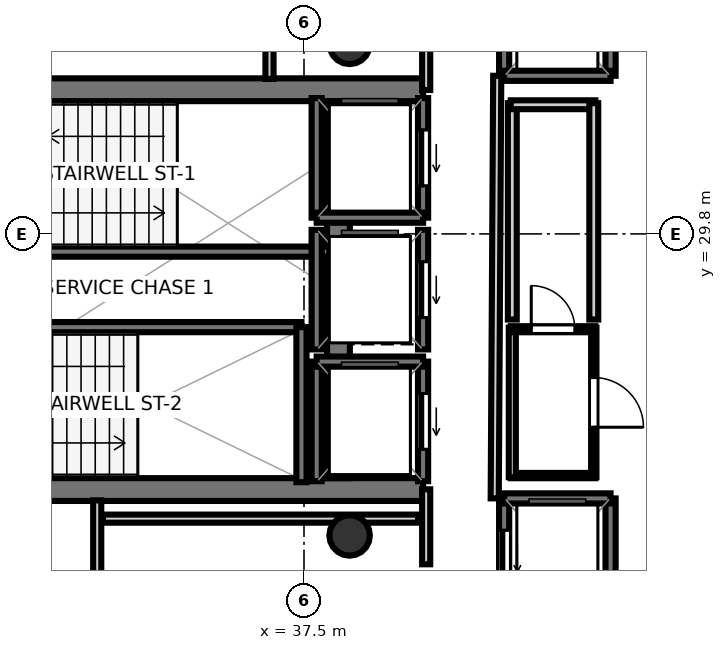
"""IFC4 building model, lengths in metres.
Left out: names, types, materials, properties, quantities, classifications, styles, units other than length and angle.
Written with IfcOpenShell. Run it as: python <this file> out.ifc"""

import sys

from ifc_helpers import new_model, si_unit, direction, frame, frame_2d, origin, origin_2d, place, context, subcontext, project, spatial, rectangle, hollow_circle, extrude, element, fill, save


model = new_model("IFC4")
c1 = context("Model", 3, precision=1e-05, world=origin(), true_north=direction((0.0, 1.0)))
c2 = subcontext(c1, "Body", "Model", "MODEL_VIEW")
j1 = project(units=[si_unit("LENGTHUNIT", "METRE"), si_unit("PLANEANGLEUNIT", "RADIAN")], contexts=[c1])
p1 = place(None, origin())
s1 = spatial("IfcSite", under=j1, at=p1, CompositionType="ELEMENT")
p2 = place(p1, origin())
s2 = spatial("IfcBuilding", under=s1, at=p2, CompositionType="ELEMENT")
p3 = place(p2, frame((0.0, 0.0, 325.9)))
s3 = spatial("IfcBuildingStorey", under=s2, at=p3, CompositionType="ELEMENT", Elevation=325.9)
p4 = place(p3, frame((29.33, 32.645, 0.0), z_axis=(0.0, 0.0, 1.0), x_axis=(1.0, 0.0, 0.0)))
e1 = element("IfcWall", 1, at=p4, inside=s3, PredefinedType="SHEAR", context=c2, shape_type="SweptSolid", body=[
    extrude(rectangle(XDim=10.52, YDim=0.45, at=frame_2d((5.26, 0.0))), origin(), (0.0, 0.0, 1.0), 3.52),
])
p5 = place(p4, frame((0.895, 0.0, 0.0)))
e2 = element("IfcOpeningElement", 2, at=p5, cuts=e1, PredefinedType="OPENING", context=c2, shape_type="SweptSolid", body=[
    extrude(rectangle(XDim=1.25, YDim=2.15, at=frame_2d((0.625, 1.075))), frame((0.0, 0.235, 0.0), z_axis=(0.0, -1.0, 0.0), x_axis=(1.0, 0.0, 0.0)), (0.0, 0.0, 1.0), 0.47),
])
p6 = place(p3, frame((29.33, 24.755, 0.0), z_axis=(0.0, 0.0, 1.0), x_axis=(1.0, 0.0, 0.0)))
e3 = element("IfcWall", 3, at=p6, inside=s3, PredefinedType="SHEAR", context=c2, shape_type="SweptSolid", body=[
    extrude(rectangle(XDim=10.52, YDim=0.45, at=frame_2d((5.26, 0.0))), origin(), (0.0, 0.0, 1.0), 3.52),
])
p7 = place(p6, frame((0.695, 0.0, 0.0)))
e4 = element("IfcOpeningElement", 4, at=p7, cuts=e3, PredefinedType="OPENING", context=c2, shape_type="SweptSolid", body=[
    extrude(rectangle(XDim=1.25, YDim=2.15, at=frame_2d((0.625, 1.075))), frame((0.0, 0.235, 0.0), z_axis=(0.0, -1.0, 0.0), x_axis=(1.0, 0.0, 0.0)), (0.0, 0.0, 1.0), 0.47),
])
p8 = place(p3, frame((38.18, 24.98, 0.0), z_axis=(0.0, 0.0, 1.0), x_axis=(0.0, 1.0, 0.0)))
e5 = element("IfcWall", 5, at=p8, inside=s3, PredefinedType="SHEAR", context=c2, shape_type="SweptSolid", body=[
    extrude(rectangle(XDim=7.44, YDim=0.45, at=frame_2d((3.72, 0.0))), origin(), (0.0, 0.0, 1.0), 3.52),
])
for number, where, z_axis, x_axis in (
    (6, (38.4, 33.55, 0.0), (0.0, 0.0, 1.0), (1.0, 0.0, 0.0)),
    (7, (38.4, 23.85, 0.0), (0.0, 0.0, 1.0), (1.0, 0.0, 0.0)),
):
    element("IfcColumn", number, at=place(p3, frame(where, z_axis=z_axis, x_axis=x_axis)), inside=s3, PredefinedType="COLUMN", context=c2, shape_type="SweptSolid", body=[
        extrude(hollow_circle(Radius=0.4, WallThickness=0.022, at=origin_2d()), origin(), (0.0, 0.0, 1.0), 3.7),
    ])
p9 = place(p3, frame((29.7, 29.45, 0.0), z_axis=(0.0, 0.0, 1.0), x_axis=(1.0, 0.0, 0.0)))
e8 = element("IfcWall", 8, at=p9, inside=s3, PredefinedType="SOLIDWALL", context=c2, shape_type="SweptSolid", body=[
    extrude(rectangle(XDim=8.3, YDim=0.2, at=frame_2d((4.15, 0.0))), origin(), (0.0, 0.0, 1.0), 3.52),
])
p10 = place(p3, frame((29.7, 27.96, 0.0), z_axis=(0.0, 0.0, 1.0), x_axis=(1.0, 0.0, 0.0)))
e9 = element("IfcWall", 9, at=p10, inside=s3, PredefinedType="SOLIDWALL", context=c2, shape_type="SweptSolid", body=[
    extrude(rectangle(XDim=7.75, YDim=0.2, at=frame_2d((3.875, 0.0))), origin(), (0.0, 0.0, 1.0), 3.52),
])
p11 = place(p3, frame((37.45, 24.9, 0.0), z_axis=(0.0, 0.0, 1.0), x_axis=(0.0, 1.0, 0.0)))
e10 = element("IfcWall", 10, at=p11, inside=s3, PredefinedType="SOLIDWALL", context=c2, shape_type="SweptSolid", body=[
    extrude(rectangle(XDim=3.06, YDim=0.2, at=frame_2d((1.53, 0.0))), origin(), (0.0, 0.0, 1.0), 3.52),
])
p12 = place(p3, frame((39.85, 30.12, 0.0), z_axis=(0.0, 0.0, 1.0), x_axis=(0.0, 1.0, 0.0)))
e11 = element("IfcWall", 11, at=p12, inside=s3, PredefinedType="SOLIDWALL", context=c2, shape_type="SweptSolid", body=[
    extrude(rectangle(XDim=2.36, YDim=0.2, at=frame_2d((1.18, 0.0))), origin(), (0.0, 0.0, 1.0), 3.52),
])
p13 = place(p12, frame((0.63, 0.0, 0.0)))
e12 = element("IfcOpeningElement", 12, at=p13, cuts=e11, PredefinedType="OPENING", context=c2, shape_type="SweptSolid", body=[
    extrude(rectangle(XDim=1.1, YDim=2.15, at=frame_2d((0.55, 1.075))), frame((0.0, 0.11, 0.0), z_axis=(0.0, -1.0, 0.0), x_axis=(1.0, 0.0, 0.0)), (0.0, 0.0, 1.0), 0.22),
])
p14 = place(p3, frame((37.75, 30.12, 0.0), z_axis=(0.0, 0.0, 1.0), x_axis=(0.0, 1.0, 0.0)))
e13 = element("IfcWall", 13, at=p14, inside=s3, PredefinedType="SOLIDWALL", context=c2, shape_type="SweptSolid", body=[
    extrude(rectangle(XDim=2.36, YDim=0.2, at=frame_2d((1.18, 0.0))), origin(), (0.0, 0.0, 1.0), 3.52),
])
p15 = place(p3, frame((37.75, 30.12, 0.0), z_axis=(0.0, 0.0, 1.0), x_axis=(1.0, 0.0, 0.0)))
e14 = element("IfcWall", 14, at=p15, inside=s3, PredefinedType="SOLIDWALL", context=c2, shape_type="SweptSolid", body=[
    extrude(rectangle(XDim=2.1, YDim=0.2, at=frame_2d((1.05, 0.0))), origin(), (0.0, 0.0, 1.0), 3.52),
])
p16 = place(p3, frame((39.85, 24.92, 0.0), z_axis=(0.0, 0.0, 1.0), x_axis=(0.0, 1.0, 0.0)))
e15 = element("IfcWall", 15, at=p16, inside=s3, PredefinedType="SOLIDWALL", context=c2, shape_type="SweptSolid", body=[
    extrude(rectangle(XDim=2.36, YDim=0.2, at=frame_2d((1.18, 0.0))), origin(), (0.0, 0.0, 1.0), 3.52),
])
p17 = place(p16, frame((0.63, 0.0, 0.0)))
e16 = element("IfcOpeningElement", 16, at=p17, cuts=e15, PredefinedType="OPENING", context=c2, shape_type="SweptSolid", body=[
    extrude(rectangle(XDim=1.1, YDim=2.15, at=frame_2d((0.55, 1.075))), frame((0.0, 0.11, 0.0), z_axis=(0.0, -1.0, 0.0), x_axis=(1.0, 0.0, 0.0)), (0.0, 0.0, 1.0), 0.22),
])
p18 = place(p3, frame((37.75, 24.92, 0.0), z_axis=(0.0, 0.0, 1.0), x_axis=(0.0, 1.0, 0.0)))
e17 = element("IfcWall", 17, at=p18, inside=s3, PredefinedType="SOLIDWALL", context=c2, shape_type="SweptSolid", body=[
    extrude(rectangle(XDim=2.36, YDim=0.2, at=frame_2d((1.18, 0.0))), origin(), (0.0, 0.0, 1.0), 3.52),
])
p19 = place(p3, frame((37.75, 27.28, 0.0), z_axis=(0.0, 0.0, 1.0), x_axis=(1.0, 0.0, 0.0)))
e18 = element("IfcWall", 18, at=p19, inside=s3, PredefinedType="SOLIDWALL", context=c2, shape_type="SweptSolid", body=[
    extrude(rectangle(XDim=2.1, YDim=0.2, at=frame_2d((1.05, 0.0))), origin(), (0.0, 0.0, 1.0), 3.52),
])
p20 = place(p3, frame((39.85, 27.52, 0.0), z_axis=(0.0, 0.0, 1.0), x_axis=(0.0, 1.0, 0.0)))
e19 = element("IfcWall", 19, at=p20, inside=s3, PredefinedType="SOLIDWALL", context=c2, shape_type="SweptSolid", body=[
    extrude(rectangle(XDim=2.36, YDim=0.2, at=frame_2d((1.18, 0.0))), origin(), (0.0, 0.0, 1.0), 3.52),
])
p21 = place(p20, frame((0.63, 0.0, 0.0)))
e20 = element("IfcOpeningElement", 20, at=p21, cuts=e19, PredefinedType="OPENING", context=c2, shape_type="SweptSolid", body=[
    extrude(rectangle(XDim=1.1, YDim=2.15, at=frame_2d((0.55, 1.075))), frame((0.0, 0.11, 0.0), z_axis=(0.0, -1.0, 0.0), x_axis=(1.0, 0.0, 0.0)), (0.0, 0.0, 1.0), 0.22),
])
p22 = place(p3, frame((37.75, 27.52, 0.0), z_axis=(0.0, 0.0, 1.0), x_axis=(0.0, 1.0, 0.0)))
e21 = element("IfcWall", 21, at=p22, inside=s3, PredefinedType="SOLIDWALL", context=c2, shape_type="SweptSolid", body=[
    extrude(rectangle(XDim=2.36, YDim=0.2, at=frame_2d((1.18, 0.0))), origin(), (0.0, 0.0, 1.0), 3.52),
])
p23 = place(p3, frame((43.55, 22.22, 0.0), z_axis=(0.0, 0.0, 1.0), x_axis=(0.0, 1.0, 0.0)))
e22 = element("IfcWall", 22, at=p23, inside=s3, PredefinedType="SOLIDWALL", context=c2, shape_type="SweptSolid", body=[
    extrude(rectangle(XDim=2.36, YDim=0.2, at=frame_2d((1.18, 0.0))), origin(), (0.0, 0.0, 1.0), 3.52),
])
p24 = place(p3, frame((41.45, 22.22, 0.0), z_axis=(0.0, 0.0, 1.0), x_axis=(0.0, 1.0, 0.0)))
e23 = element("IfcWall", 23, at=p24, inside=s3, PredefinedType="SOLIDWALL", context=c2, shape_type="SweptSolid", body=[
    extrude(rectangle(XDim=2.36, YDim=0.2, at=frame_2d((1.18, 0.0))), origin(), (0.0, 0.0, 1.0), 3.52),
])
p25 = place(p24, frame((0.63, 0.0, 0.0)))
e24 = element("IfcOpeningElement", 24, at=p25, cuts=e23, PredefinedType="OPENING", context=c2, shape_type="SweptSolid", body=[
    extrude(rectangle(XDim=1.1, YDim=2.15, at=frame_2d((0.55, 1.075))), frame((0.0, 0.11, 0.0), z_axis=(0.0, -1.0, 0.0), x_axis=(1.0, 0.0, 0.0)), (0.0, 0.0, 1.0), 0.22),
])
p26 = place(p3, frame((41.45, 24.58, 0.0), z_axis=(0.0, 0.0, 1.0), x_axis=(1.0, 0.0, 0.0)))
e25 = element("IfcWall", 25, at=p26, inside=s3, PredefinedType="SOLIDWALL", context=c2, shape_type="SweptSolid", body=[
    extrude(rectangle(XDim=2.1, YDim=0.2, at=frame_2d((1.05, 0.0))), origin(), (0.0, 0.0, 1.0), 3.52),
])
p27 = place(p3, frame((43.55, 32.92, 0.0), z_axis=(0.0, 0.0, 1.0), x_axis=(0.0, 1.0, 0.0)))
e26 = element("IfcWall", 26, at=p27, inside=s3, PredefinedType="SOLIDWALL", context=c2, shape_type="SweptSolid", body=[
    extrude(rectangle(XDim=2.36, YDim=0.2, at=frame_2d((1.18, 0.0))), origin(), (0.0, 0.0, 1.0), 3.52),
])
p28 = place(p3, frame((41.45, 32.92, 0.0), z_axis=(0.0, 0.0, 1.0), x_axis=(0.0, 1.0, 0.0)))
e27 = element("IfcWall", 27, at=p28, inside=s3, PredefinedType="SOLIDWALL", context=c2, shape_type="SweptSolid", body=[
    extrude(rectangle(XDim=2.36, YDim=0.2, at=frame_2d((1.18, 0.0))), origin(), (0.0, 0.0, 1.0), 3.52),
])
p29 = place(p28, frame((0.63, 0.0, 0.0)))
e28 = element("IfcOpeningElement", 28, at=p29, cuts=e27, PredefinedType="OPENING", context=c2, shape_type="SweptSolid", body=[
    extrude(rectangle(XDim=1.1, YDim=2.15, at=frame_2d((0.55, 1.075))), frame((0.0, 0.11, 0.0), z_axis=(0.0, -1.0, 0.0), x_axis=(1.0, 0.0, 0.0)), (0.0, 0.0, 1.0), 0.22),
])
p30 = place(p3, frame((41.45, 32.92, 0.0), z_axis=(0.0, 0.0, 1.0), x_axis=(1.0, 0.0, 0.0)))
e29 = element("IfcWall", 29, at=p30, inside=s3, PredefinedType="SOLIDWALL", context=c2, shape_type="SweptSolid", body=[
    extrude(rectangle(XDim=2.1, YDim=0.2, at=frame_2d((1.05, 0.0))), origin(), (0.0, 0.0, 1.0), 3.52),
])
p31 = place(p3, frame((36.819, 36.783, 0.0), z_axis=(0.0, 0.0, 1.0), x_axis=(0.0, -1.0, 0.0)))
e30 = element("IfcWall", 30, at=p31, inside=s3, PredefinedType="PARTITIONING", context=c2, shape_type="SweptSolid", body=[
    extrude(rectangle(XDim=3.925, YDim=0.16, at=frame_2d((1.963, 0.0))), origin(), (0.0, 0.0, 1.0), 2.84),
])
p32 = place(p3, frame((33.419, 24.542, 0.0), z_axis=(0.0, 0.0, 1.0), x_axis=(0.0, -1.0, 0.0)))
e31 = element("IfcWall", 31, at=p32, inside=s3, PredefinedType="PARTITIONING", context=c2, shape_type="SweptSolid", body=[
    extrude(rectangle(XDim=2.692, YDim=0.16, at=frame_2d((1.346, 0.0))), origin(), (0.0, 0.0, 1.0), 2.84),
])
p33 = place(p3, frame((39.911, 23.28, 0.0), z_axis=(0.0, 0.0, 1.0), x_axis=(0.0, 1.0, 0.0)))
e32 = element("IfcWall", 32, at=p33, inside=s3, PredefinedType="PARTITIONING", context=c2, shape_type="SweptSolid", body=[
    extrude(rectangle(XDim=1.48, YDim=0.16, at=frame_2d((0.74, 0.0))), origin(), (0.0, 0.0, 1.0), 2.84),
])
p34 = place(p3, frame((39.911, 32.64, 0.0), z_axis=(0.0, 0.0, 1.0), x_axis=(0.0, 1.0, 0.0)))
e33 = element("IfcWall", 33, at=p34, inside=s3, PredefinedType="PARTITIONING", context=c2, shape_type="SweptSolid", body=[
    extrude(rectangle(XDim=2.88, YDim=0.16, at=frame_2d((1.44, 0.0))), origin(), (0.0, 0.0, 1.0), 2.84),
])
p35 = place(p3, frame((41.313, 32.92, 0.0), z_axis=(0.0, 0.0, 1.0), x_axis=(-0.005942518022, -0.999982343084, 0.0)))
e34 = element("IfcWall", 34, at=p35, inside=s3, PredefinedType="PARTITIONING", context=c2, shape_type="SweptSolid", body=[
    extrude(rectangle(XDim=8.34, YDim=0.16, at=frame_2d((4.17, 0.0))), origin(), (0.0, 0.0, 1.0), 2.84),
])
p36 = place(p3, frame((43.25, 25.031, 0.0), z_axis=(0.0, 0.0, 1.0), x_axis=(-1.0, 0.0, 0.0)))
e35 = element("IfcWall", 35, at=p36, inside=s3, PredefinedType="PARTITIONING", context=c2, shape_type="SweptSolid", body=[
    extrude(rectangle(XDim=1.67, YDim=0.105, at=frame_2d((0.835, 0.0))), origin(), (0.0, 0.0, 1.0), 2.84),
])
p37 = place(p3, frame((41.611, 25.0, 0.0), z_axis=(0.0, 0.0, 1.0), x_axis=(0.0, 1.0, 0.0)))
e36 = element("IfcWall", 36, at=p37, inside=s3, PredefinedType="PARTITIONING", context=c2, shape_type="SweptSolid", body=[
    extrude(rectangle(XDim=2.95, YDim=0.14, at=frame_2d((1.475, 0.0))), origin(), (0.0, 0.0, 1.0), 2.84),
])
p38 = place(p3, frame((41.58, 27.919, 0.0), z_axis=(0.0, 0.0, 1.0), x_axis=(1.0, 0.0, 0.0)))
e37 = element("IfcWall", 37, at=p38, inside=s3, PredefinedType="PARTITIONING", context=c2, shape_type="SweptSolid", body=[
    extrude(rectangle(XDim=1.67, YDim=0.12, at=frame_2d((0.835, 0.0))), origin(), (0.0, 0.0, 1.0), 2.84),
])
p39 = place(p38, frame((0.405, 0.0, 0.0)))
e38 = element("IfcOpeningElement", 38, at=p39, cuts=e37, PredefinedType="OPENING", context=c2, shape_type="SweptSolid", body=[
    extrude(rectangle(XDim=0.86, YDim=2.05, at=frame_2d((0.43, 1.025))), frame((0.0, 0.07, 0.0), z_axis=(0.0, -1.0, 0.0), x_axis=(1.0, 0.0, 0.0)), (0.0, 0.0, 1.0), 0.14),
])
p40 = place(p3, frame((43.219, 27.95, 0.0), z_axis=(0.0, 0.0, 1.0), x_axis=(0.0, -1.0, 0.0)))
e39 = element("IfcWall", 39, at=p40, inside=s3, PredefinedType="PARTITIONING", context=c2, shape_type="SweptSolid", body=[
    extrude(rectangle(XDim=2.95, YDim=0.105, at=frame_2d((1.475, 0.0))), origin(), (0.0, 0.0, 1.0), 2.84),
])
p41 = place(p40, frame((0.985, 0.0, 0.0)))
e40 = element("IfcOpeningElement", 40, at=p41, cuts=e39, PredefinedType="OPENING", context=c2, shape_type="SweptSolid", body=[
    extrude(rectangle(XDim=0.98, YDim=2.1, at=frame_2d((0.49, 1.05))), frame((0.0, 0.062, 0.0), z_axis=(0.0, -1.0, 0.0), x_axis=(1.0, 0.0, 0.0)), (0.0, 0.0, 1.0), 0.125),
])
p42 = place(p3, frame((41.611, 28.11, 0.0), z_axis=(0.0, 0.0, 1.0), x_axis=(0.0, 1.0, 0.0)))
e41 = element("IfcWall", 41, at=p42, inside=s3, PredefinedType="PLUMBINGWALL", context=c2, shape_type="SweptSolid", body=[
    extrude(rectangle(XDim=4.27, YDim=0.175, at=frame_2d((2.135, 0.0))), origin(), (0.0, 0.0, 1.0), 2.84),
])
p43 = place(p3, frame((41.58, 32.349, 0.0), z_axis=(0.0, 0.0, 1.0), x_axis=(1.0, 0.0, 0.0)))
e42 = element("IfcWall", 42, at=p43, inside=s3, PredefinedType="PLUMBINGWALL", context=c2, shape_type="SweptSolid", body=[
    extrude(rectangle(XDim=1.67, YDim=0.175, at=frame_2d((0.835, 0.0))), origin(), (0.0, 0.0, 1.0), 2.84),
])
p44 = place(p3, frame((43.219, 32.38, 0.0), z_axis=(0.0, 0.0, 1.0), x_axis=(0.0, -1.0, 0.0)))
e43 = element("IfcWall", 43, at=p44, inside=s3, PredefinedType="PLUMBINGWALL", context=c2, shape_type="SweptSolid", body=[
    extrude(rectangle(XDim=4.27, YDim=0.175, at=frame_2d((2.135, 0.0))), origin(), (0.0, 0.0, 1.0), 2.84),
])
p45 = place(p3, frame((39.75, 24.181, 0.0), z_axis=(0.0, 0.0, 1.0), x_axis=(-1.0, 0.0, 0.0)))
e44 = element("IfcWall", 44, at=p45, inside=s3, PredefinedType="PARTITIONING", context=c2, shape_type="SweptSolid", body=[
    extrude(rectangle(XDim=6.22, YDim=0.16, at=frame_2d((3.11, 0.0))), origin(), (0.0, 0.0, 1.0), 2.84),
])
p46 = place(p13, origin())
e45 = element("IfcDoor", 45, at=p46, inside=s3, OperationType="SLIDING_TO_LEFT", PredefinedType="DOOR", context=c2, shape_type="SweptSolid", body=[
    extrude(rectangle(XDim=1.1, YDim=2.15, at=frame_2d((0.55, 1.075))), frame((0.0, 0.025, 0.0), z_axis=(0.0, -1.0, 0.0), x_axis=(1.0, 0.0, 0.0)), (0.0, 0.0, 1.0), 0.05),
])
fill(e12, e45)
p47 = place(p17, origin())
e46 = element("IfcDoor", 46, at=p47, inside=s3, OperationType="SLIDING_TO_LEFT", PredefinedType="DOOR", context=c2, shape_type="SweptSolid", body=[
    extrude(rectangle(XDim=1.1, YDim=2.15, at=frame_2d((0.55, 1.075))), frame((0.0, 0.025, 0.0), z_axis=(0.0, -1.0, 0.0), x_axis=(1.0, 0.0, 0.0)), (0.0, 0.0, 1.0), 0.05),
])
fill(e16, e46)
p48 = place(p21, origin())
e47 = element("IfcDoor", 47, at=p48, inside=s3, OperationType="SLIDING_TO_LEFT", PredefinedType="DOOR", context=c2, shape_type="SweptSolid", body=[
    extrude(rectangle(XDim=1.1, YDim=2.15, at=frame_2d((0.55, 1.075))), frame((0.0, 0.025, 0.0), z_axis=(0.0, -1.0, 0.0), x_axis=(1.0, 0.0, 0.0)), (0.0, 0.0, 1.0), 0.05),
])
fill(e20, e47)
p49 = place(p25, origin())
e48 = element("IfcDoor", 48, at=p49, inside=s3, OperationType="SLIDING_TO_LEFT", PredefinedType="DOOR", context=c2, shape_type="SweptSolid", body=[
    extrude(rectangle(XDim=1.1, YDim=2.15, at=frame_2d((0.55, 1.075))), frame((0.0, 0.025, 0.0), z_axis=(0.0, -1.0, 0.0), x_axis=(1.0, 0.0, 0.0)), (0.0, 0.0, 1.0), 0.05),
])
fill(e24, e48)
p50 = place(p41, origin())
e49 = element("IfcDoor", 49, at=p50, inside=s3, OperationType="SINGLE_SWING_RIGHT", PredefinedType="DOOR", context=c2, shape_type="SweptSolid", body=[
    extrude(rectangle(XDim=0.98, YDim=2.1, at=frame_2d((0.49, 1.05))), frame((0.0, 0.025, 0.0), z_axis=(0.0, -1.0, 0.0), x_axis=(1.0, 0.0, 0.0)), (0.0, 0.0, 1.0), 0.05),
])
fill(e40, e49)
p51 = place(p39, origin())
e50 = element("IfcDoor", 50, at=p51, inside=s3, OperationType="SINGLE_SWING_LEFT", PredefinedType="DOOR", context=c2, shape_type="SweptSolid", body=[
    extrude(rectangle(XDim=0.86, YDim=2.05, at=frame_2d((0.43, 1.025))), frame((0.0, 0.025, 0.0), z_axis=(0.0, -1.0, 0.0), x_axis=(1.0, 0.0, 0.0)), (0.0, 0.0, 1.0), 0.05),
])
fill(e38, e50)
save(model, sys.argv[1])
